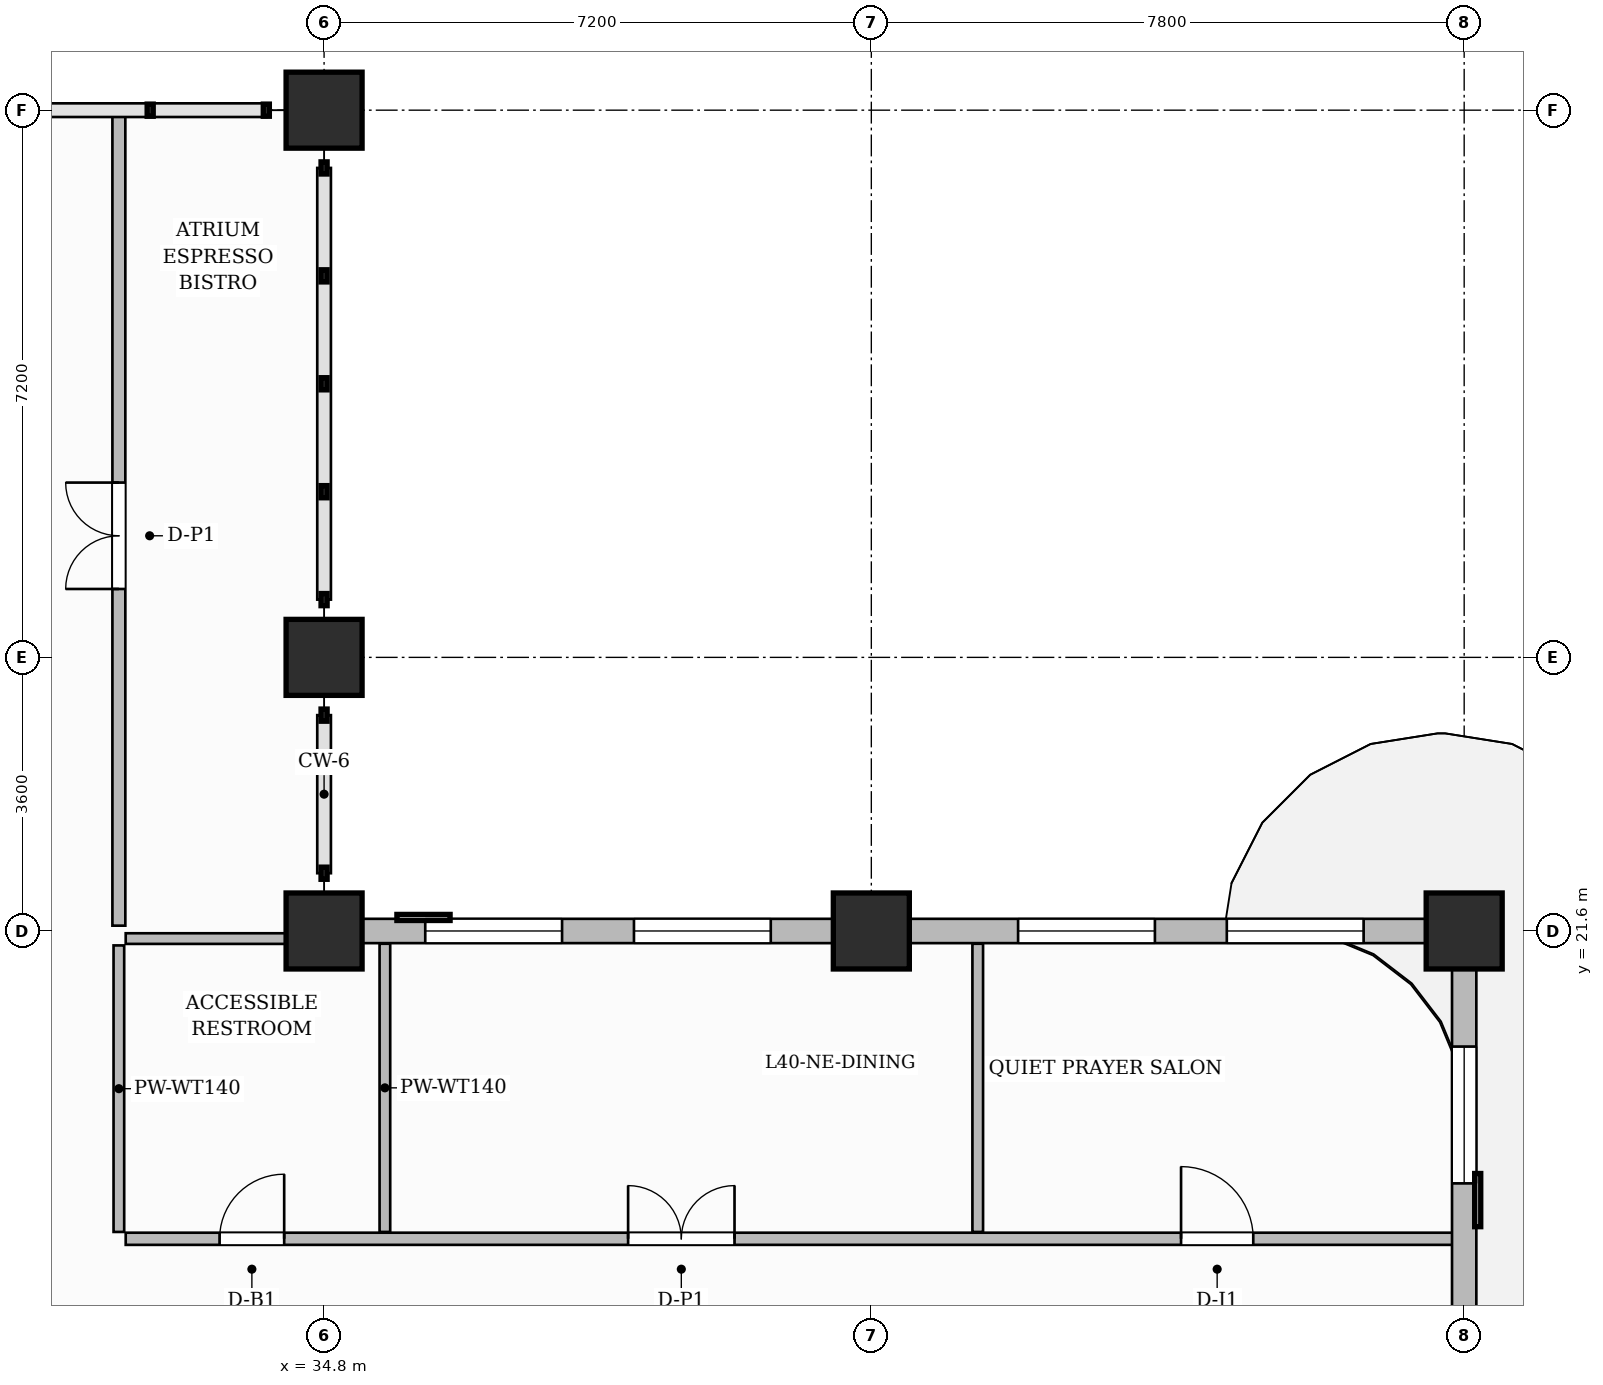
"""IFC4 building model, lengths in metres.
Left out: names, types, materials, properties, quantities, classifications, styles, units other than length and angle.
Written with IfcOpenShell. Run it as: python <this file> out.ifc"""

import sys

from ifc_helpers import new_model, si_unit, direction, frame, frame_2d, origin, origin_2d, place, context, subcontext, project, spatial, rectangle, extrude, source, transform, mapped, element, fill, save


model = new_model("IFC4")
c1 = context("Model", 3, precision=1e-05, world=origin(), true_north=direction((0.0, 1.0)))
c2 = subcontext(c1, "Body", "Model", "MODEL_VIEW")
j1 = project(units=[si_unit("LENGTHUNIT", "METRE"), si_unit("PLANEANGLEUNIT", "RADIAN")], contexts=[c1])
p1 = place(None, origin())
s1 = spatial("IfcSite", under=j1, at=p1, CompositionType="ELEMENT")
p2 = place(p1, origin())
s2 = spatial("IfcBuilding", under=s1, at=p2, CompositionType="ELEMENT")
p3 = place(p2, frame((0.0, 0.0, 161.85)))
s3 = spatial("IfcBuildingStorey", under=s2, at=p3, CompositionType="ELEMENT", Elevation=161.85)
m1 = source(origin(), c2, "Body", "SweptSolid", [
    extrude(rectangle(XDim=1.0, YDim=1.0, at=origin_2d()), origin(), (0.0, 0.0, 1.0), 3.85),
])
for number, where, z_axis, x_axis in (
    (1, (34.8, 21.6, 0.0), (0.0, 0.0, 1.0), (1.0, 0.0, 0.0)),
    (2, (34.8, 25.2, 0.0), (0.0, 0.0, 1.0), (1.0, 0.0, 0.0)),
    (3, (34.8, 32.4, 0.0), (0.0, 0.0, 1.0), (1.0, 0.0, 0.0)),
    (4, (42.0, 21.6, 0.0), (0.0, 0.0, 1.0), (1.0, 0.0, 0.0)),
    (5, (49.8, 21.6, 0.0), (0.0, 0.0, 1.0), (1.0, 0.0, 0.0)),
):
    element("IfcColumn", number, at=place(p3, frame(where, z_axis=z_axis, x_axis=x_axis)), inside=s3, PredefinedType="COLUMN", context=c2, shape_type="MappedRepresentation", body=[
        mapped(m1, transform((0.0, 0.0, 0.0), scale=1.0)),
    ])
p4 = place(p3, frame((32.19, 17.55, 0.0), z_axis=(0.0, 0.0, 1.0), x_axis=(1.0, 0.0, 0.0)))
e6 = element("IfcWall", 6, at=p4, inside=s3, PredefinedType="PARTITIONING", context=c2, shape_type="SweptSolid", body=[
    extrude(rectangle(XDim=17.47, YDim=0.16, at=frame_2d((8.735, 0.0))), origin(), (0.0, 0.0, 1.0), 3.6),
])
p5 = place(p4, frame((1.235, 0.0, 0.0)))
e7 = element("IfcOpeningElement", 7, at=p5, cuts=e6, PredefinedType="OPENING", context=c2, shape_type="SweptSolid", body=[
    extrude(rectangle(XDim=0.85, YDim=2.1, at=frame_2d((0.425, 1.05))), frame((0.0, 0.09, 0.0), z_axis=(0.0, -1.0, 0.0), x_axis=(1.0, 0.0, 0.0)), (0.0, 0.0, 1.0), 0.18),
])
p6 = place(p4, frame((6.61, 0.0, 0.0)))
e8 = element("IfcOpeningElement", 8, at=p6, cuts=e6, PredefinedType="OPENING", context=c2, shape_type="SweptSolid", body=[
    extrude(rectangle(XDim=1.4, YDim=2.35, at=frame_2d((0.7, 1.175))), frame((0.0, 0.09, 0.0), z_axis=(0.0, -1.0, 0.0), x_axis=(1.0, 0.0, 0.0)), (0.0, 0.0, 1.0), 0.18),
])
p7 = place(p4, frame((13.885, 0.0, 0.0)))
e9 = element("IfcOpeningElement", 9, at=p7, cuts=e6, PredefinedType="OPENING", context=c2, shape_type="SweptSolid", body=[
    extrude(rectangle(XDim=0.95, YDim=2.15, at=frame_2d((0.475, 1.075))), frame((0.0, 0.09, 0.0), z_axis=(0.0, -1.0, 0.0), x_axis=(1.0, 0.0, 0.0)), (0.0, 0.0, 1.0), 0.18),
])
p8 = place(p3, frame((32.1, 17.64, 0.0), z_axis=(0.0, 0.0, 1.0), x_axis=(0.0, 1.0, 0.0)))
e10 = element("IfcWall", 10, at=p8, inside=s3, PredefinedType="PARTITIONING", context=c2, shape_type="SweptSolid", body=[
    extrude(rectangle(XDim=3.77, YDim=0.14, at=frame_2d((1.885, 0.0))), origin(), (0.0, 0.0, 1.0), 3.6),
])
for number, where, z_axis, x_axis in (
    (11, (35.6, 17.64, 0.0), (0.0, 0.0, 1.0), (0.0, 1.0, 0.0)),
    (12, (43.4, 17.64, 0.0), (0.0, 0.0, 1.0), (0.0, 1.0, 0.0)),
):
    element("IfcWall", number, at=place(p3, frame(where, z_axis=z_axis, x_axis=x_axis)), inside=s3, PredefinedType="PARTITIONING", context=c2, shape_type="SweptSolid", body=[
        extrude(rectangle(XDim=3.792, YDim=0.14, at=frame_2d((1.896, 0.0))), origin(), (0.0, 0.0, 1.0), 3.6),
    ])
p9 = place(p3, frame((32.19, 21.5, 0.0), z_axis=(0.0, 0.0, 1.0), x_axis=(1.0, 0.0, 0.0)))
e13 = element("IfcWall", 13, at=p9, inside=s3, PredefinedType="PARTITIONING", context=c2, shape_type="SweptSolid", body=[
    extrude(rectangle(XDim=2.42, YDim=0.14, at=frame_2d((1.21, 0.0))), origin(), (0.0, 0.0, 1.0), 3.085),
])
p10 = place(p3, frame((32.1, 21.67, 0.0), z_axis=(0.0, 0.0, 1.0), x_axis=(0.0, 1.0, 0.0)))
e14 = element("IfcWall", 14, at=p10, inside=s3, PredefinedType="PARTITIONING", context=c2, shape_type="SweptSolid", body=[
    extrude(rectangle(XDim=10.702, YDim=0.17, at=frame_2d((5.351, 0.0))), origin(), (0.0, 0.0, 1.0), 3.6),
])
p11 = place(p10, frame((4.43, 0.0, 0.0)))
e15 = element("IfcOpeningElement", 15, at=p11, cuts=e14, PredefinedType="OPENING", context=c2, shape_type="SweptSolid", body=[
    extrude(rectangle(XDim=1.4, YDim=2.35, at=frame_2d((0.7, 1.175))), frame((0.0, 0.095, 0.0), z_axis=(0.0, -1.0, 0.0), x_axis=(1.0, 0.0, 0.0)), (0.0, 0.0, 1.0), 0.19),
])
p12 = place(p3, frame((49.8, 14.62, 0.0), z_axis=(0.0, 0.0, 1.0), x_axis=(0.0, 1.0, 0.0)))
e16 = element("IfcWall", 16, at=p12, inside=s3, PredefinedType="SOLIDWALL", context=c2, shape_type="SweptSolid", body=[
    extrude(rectangle(XDim=6.93, YDim=0.32, at=frame_2d((3.465, 0.0))), origin(), (0.0, 0.0, 1.0), 3.085),
])
p13 = place(p12, frame((0.42, 0.0, 0.0)))
e17 = element("IfcOpeningElement", 17, at=p13, cuts=e16, PredefinedType="OPENING", context=c2, shape_type="SweptSolid", body=[
    extrude(rectangle(XDim=1.2, YDim=2.2, at=frame_2d((0.6, 1.1))), frame((0.0, 0.17, 0.0), z_axis=(0.0, -1.0, 0.0), x_axis=(1.0, 0.0, 0.0)), (0.0, 0.0, 1.0), 0.34),
])
p14 = place(p12, frame((3.659, 0.0, 0.8)))
e18 = element("IfcOpeningElement", 18, at=p14, cuts=e16, PredefinedType="OPENING", context=c2, shape_type="SweptSolid", body=[
    extrude(rectangle(XDim=1.8, YDim=1.85, at=frame_2d((0.9, 0.925))), frame((0.0, 0.17, 0.0), z_axis=(0.0, -1.0, 0.0), x_axis=(1.0, 0.0, 0.0)), (0.0, 0.0, 1.0), 0.34),
])
p15 = place(p3, frame((34.8, 21.6, 0.0), z_axis=(0.0, 0.0, 1.0), x_axis=(1.0, 0.0, 0.0)))
e19 = element("IfcWall", 19, at=p15, inside=s3, PredefinedType="SOLIDWALL", context=c2, shape_type="SweptSolid", body=[
    extrude(rectangle(XDim=15.0, YDim=0.32, at=frame_2d((7.5, 0.0))), origin(), (0.0, 0.0, 1.0), 3.085),
])
p16 = place(p15, frame((1.331, 0.0, 0.8)))
e20 = element("IfcOpeningElement", 20, at=p16, cuts=e19, PredefinedType="OPENING", context=c2, shape_type="SweptSolid", body=[
    extrude(rectangle(XDim=1.8, YDim=1.85, at=frame_2d((0.9, 0.925))), frame((0.0, 0.17, 0.0), z_axis=(0.0, -1.0, 0.0), x_axis=(1.0, 0.0, 0.0)), (0.0, 0.0, 1.0), 0.34),
])
p17 = place(p15, frame((4.077, 0.0, 0.8)))
e21 = element("IfcOpeningElement", 21, at=p17, cuts=e19, PredefinedType="OPENING", context=c2, shape_type="SweptSolid", body=[
    extrude(rectangle(XDim=1.8, YDim=1.85, at=frame_2d((0.9, 0.925))), frame((0.0, 0.17, 0.0), z_axis=(0.0, -1.0, 0.0), x_axis=(1.0, 0.0, 0.0)), (0.0, 0.0, 1.0), 0.34),
])
p18 = place(p15, frame((9.131, 0.0, 0.8)))
e22 = element("IfcOpeningElement", 22, at=p18, cuts=e19, PredefinedType="OPENING", context=c2, shape_type="SweptSolid", body=[
    extrude(rectangle(XDim=1.8, YDim=1.85, at=frame_2d((0.9, 0.925))), frame((0.0, 0.17, 0.0), z_axis=(0.0, -1.0, 0.0), x_axis=(1.0, 0.0, 0.0)), (0.0, 0.0, 1.0), 0.34),
])
p19 = place(p15, frame((11.877, 0.0, 0.8)))
e23 = element("IfcOpeningElement", 23, at=p19, cuts=e19, PredefinedType="OPENING", context=c2, shape_type="SweptSolid", body=[
    extrude(rectangle(XDim=1.8, YDim=1.85, at=frame_2d((0.9, 0.925))), frame((0.0, 0.17, 0.0), z_axis=(0.0, -1.0, 0.0), x_axis=(1.0, 0.0, 0.0)), (0.0, 0.0, 1.0), 0.34),
])
m2 = source(origin(), c2, "Body", "SweptSolid", [
    extrude(rectangle(XDim=0.85, YDim=2.1, at=frame_2d((0.425, 1.05))), frame((0.0, 0.025, 0.0), z_axis=(0.0, -1.0, 0.0), x_axis=(1.0, 0.0, 0.0)), (0.0, 0.0, 1.0), 0.05),
])
p20 = place(p5, origin())
e24 = element("IfcDoor", 24, at=p20, inside=s3, OperationType="SINGLE_SWING_RIGHT", PredefinedType="DOOR", context=c2, shape_type="MappedRepresentation", body=[
    mapped(m2, transform((0.0, 0.0, 0.0), scale=1.0)),
])
fill(e7, e24)
m3 = source(origin(), c2, "Body", "SweptSolid", [
    extrude(rectangle(XDim=1.4, YDim=2.35, at=frame_2d((0.7, 1.175))), frame((0.0, 0.025, 0.0), z_axis=(0.0, -1.0, 0.0), x_axis=(1.0, 0.0, 0.0)), (0.0, 0.0, 1.0), 0.05),
])
p21 = place(p6, origin())
e25 = element("IfcDoor", 25, at=p21, inside=s3, OperationType="DOUBLE_DOOR_SINGLE_SWING", PredefinedType="DOOR", context=c2, shape_type="MappedRepresentation", body=[
    mapped(m3, transform((0.0, 0.0, 0.0), scale=1.0)),
])
fill(e8, e25)
m4 = source(origin(), c2, "Body", "SweptSolid", [
    extrude(rectangle(XDim=0.95, YDim=2.15, at=frame_2d((0.475, 1.075))), frame((0.0, 0.025, 0.0), z_axis=(0.0, -1.0, 0.0), x_axis=(1.0, 0.0, 0.0)), (0.0, 0.0, 1.0), 0.05),
])
p22 = place(p7, origin())
e26 = element("IfcDoor", 26, at=p22, inside=s3, OperationType="SINGLE_SWING_LEFT", PredefinedType="DOOR", context=c2, shape_type="MappedRepresentation", body=[
    mapped(m4, transform((0.0, 0.0, 0.0), scale=1.0)),
])
fill(e9, e26)
p23 = place(p11, origin())
e27 = element("IfcDoor", 27, at=p23, inside=s3, OperationType="DOUBLE_DOOR_SINGLE_SWING", PredefinedType="DOOR", context=c2, shape_type="MappedRepresentation", body=[
    mapped(m3, transform((0.0, 0.0, 0.0), scale=1.0)),
])
fill(e15, e27)
m5 = source(origin(), c2, "Body", "SweptSolid", [
    extrude(rectangle(XDim=1.8, YDim=1.85, at=frame_2d((0.9, 0.925))), frame((0.0, 0.03, 0.0), z_axis=(0.0, -1.0, 0.0), x_axis=(1.0, 0.0, 0.0)), (0.0, 0.0, 1.0), 0.06),
])
p24 = place(p14, origin())
e28 = element("IfcWindow", 28, at=p24, inside=s3, PartitioningType="DOUBLE_PANEL_VERTICAL", PredefinedType="WINDOW", context=c2, shape_type="MappedRepresentation", body=[
    mapped(m5, transform((0.0, 0.0, 0.0), scale=1.0)),
])
fill(e18, e28)
p25 = place(p16, origin())
e29 = element("IfcWindow", 29, at=p25, inside=s3, PartitioningType="DOUBLE_PANEL_VERTICAL", PredefinedType="WINDOW", context=c2, shape_type="MappedRepresentation", body=[
    mapped(m5, transform((0.0, 0.0, 0.0), scale=1.0)),
])
fill(e20, e29)
p26 = place(p17, origin())
e30 = element("IfcWindow", 30, at=p26, inside=s3, PartitioningType="DOUBLE_PANEL_VERTICAL", PredefinedType="WINDOW", context=c2, shape_type="MappedRepresentation", body=[
    mapped(m5, transform((0.0, 0.0, 0.0), scale=1.0)),
])
fill(e21, e30)
p27 = place(p18, origin())
e31 = element("IfcWindow", 31, at=p27, inside=s3, PartitioningType="DOUBLE_PANEL_VERTICAL", PredefinedType="WINDOW", context=c2, shape_type="MappedRepresentation", body=[
    mapped(m5, transform((0.0, 0.0, 0.0), scale=1.0)),
])
fill(e22, e31)
p28 = place(p19, origin())
e32 = element("IfcWindow", 32, at=p28, inside=s3, PartitioningType="DOUBLE_PANEL_VERTICAL", PredefinedType="WINDOW", context=c2, shape_type="MappedRepresentation", body=[
    mapped(m5, transform((0.0, 0.0, 0.0), scale=1.0)),
])
fill(e23, e32)
save(model, sys.argv[1])
